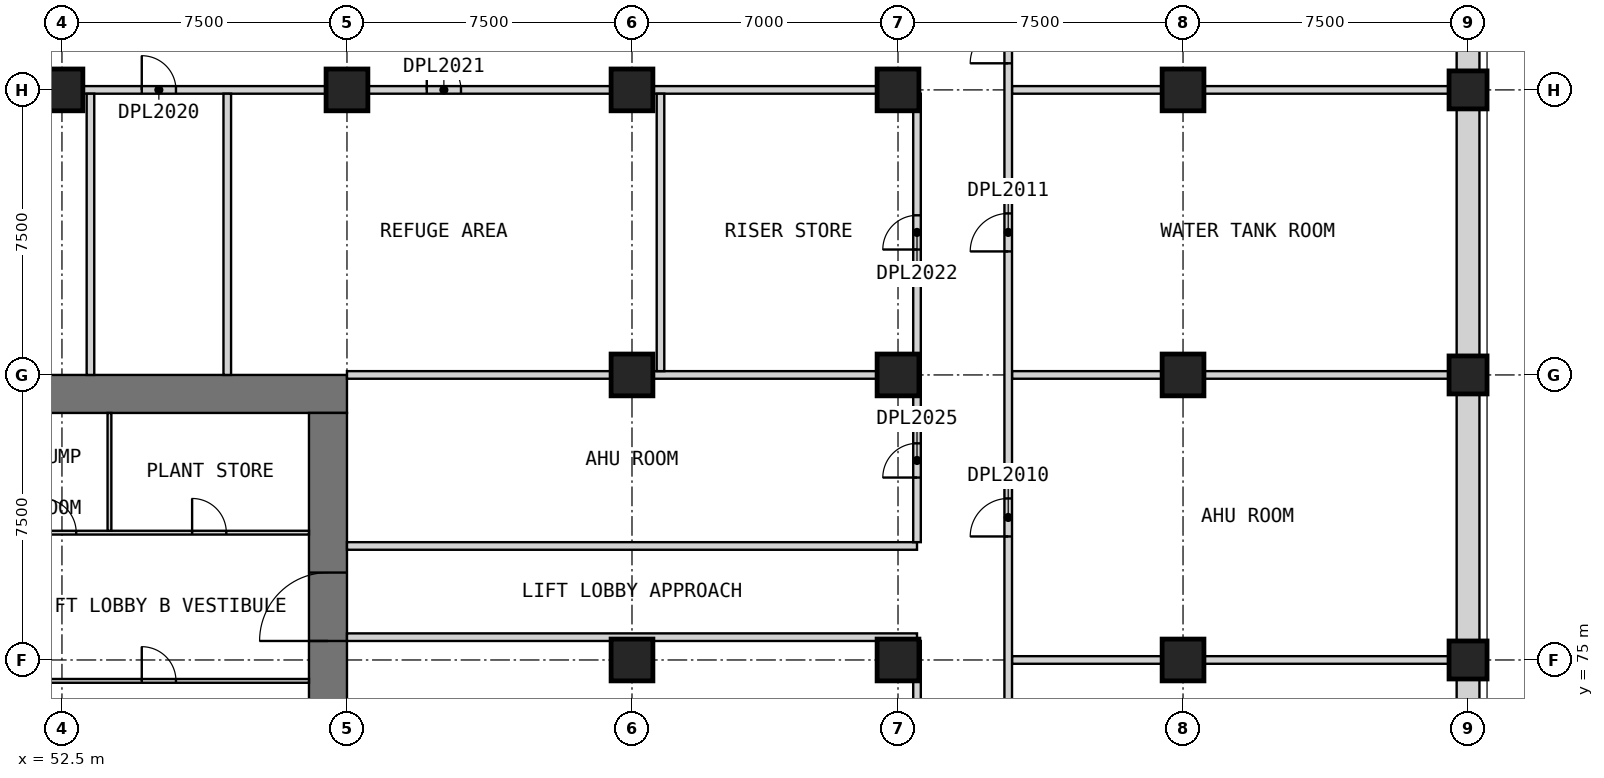
"""IFC4 building model, lengths in metres.
Left out: names, types, materials, properties, quantities, classifications, styles, units other than length and angle.
Written with IfcOpenShell. Run it as: python <this file> out.ifc"""

import sys

from ifc_helpers import new_model, si_unit, direction, frame, frame_2d, origin, origin_2d, place, context, subcontext, project, spatial, rectangle, extrude, element, fill, save


model = new_model("IFC4")
c1 = context("Model", 3, precision=1e-05, world=origin(), true_north=direction((0.0, 1.0)))
c2 = subcontext(c1, "Body", "Model", "MODEL_VIEW")
j1 = project(units=[si_unit("LENGTHUNIT", "METRE"), si_unit("PLANEANGLEUNIT", "RADIAN")], contexts=[c1])
p1 = place(None, origin())
s1 = spatial("IfcSite", under=j1, at=p1, CompositionType="ELEMENT")
p2 = place(p1, origin())
s2 = spatial("IfcBuilding", under=s1, at=p2, CompositionType="ELEMENT")
p3 = place(p2, frame((0.0, 0.0, 118.7)))
s3 = spatial("IfcBuildingStorey", under=s2, at=p3, CompositionType="ELEMENT", Elevation=118.7)
for number, where, z_axis, x_axis in (
    (1, (52.5, 90.0, 0.0), (0.0, 0.0, 1.0), (1.0, 0.0, 0.0)),
    (2, (60.0, 90.0, 0.0), (0.0, 0.0, 1.0), (1.0, 0.0, 0.0)),
    (3, (67.5, 75.0, 0.0), (0.0, 0.0, 1.0), (1.0, 0.0, 0.0)),
    (4, (67.5, 82.5, 0.0), (0.0, 0.0, 1.0), (1.0, 0.0, 0.0)),
    (5, (67.5, 90.0, 0.0), (0.0, 0.0, 1.0), (1.0, 0.0, 0.0)),
    (6, (74.5, 75.0, 0.0), (0.0, 0.0, 1.0), (1.0, 0.0, 0.0)),
    (7, (74.5, 82.5, 0.0), (0.0, 0.0, 1.0), (1.0, 0.0, 0.0)),
    (8, (74.5, 90.0, 0.0), (0.0, 0.0, 1.0), (1.0, 0.0, 0.0)),
    (9, (82.0, 75.0, 0.0), (0.0, 0.0, 1.0), (1.0, 0.0, 0.0)),
    (10, (82.0, 82.5, 0.0), (0.0, 0.0, 1.0), (1.0, 0.0, 0.0)),
    (11, (82.0, 90.0, 0.0), (0.0, 0.0, 1.0), (1.0, 0.0, 0.0)),
):
    element("IfcColumn", number, at=place(p3, frame(where, z_axis=z_axis, x_axis=x_axis)), inside=s3, PredefinedType="COLUMN", context=c2, shape_type="SweptSolid", body=[
        extrude(rectangle(XDim=1.1, YDim=1.1, at=origin_2d()), origin(), (0.0, 0.0, 1.0), 5.5),
    ])
for number, where, z_axis, x_axis in (
    (12, (89.5, 75.0, 0.0), (0.0, 0.0, 1.0), (1.0, 0.0, 0.0)),
    (13, (89.5, 82.5, 0.0), (0.0, 0.0, 1.0), (1.0, 0.0, 0.0)),
    (14, (89.5, 90.0, 0.0), (0.0, 0.0, 1.0), (1.0, 0.0, 0.0)),
):
    element("IfcColumn", number, at=place(p3, frame(where, z_axis=z_axis, x_axis=x_axis)), inside=s3, PredefinedType="COLUMN", context=c2, shape_type="SweptSolid", body=[
        extrude(rectangle(XDim=1.0, YDim=1.0, at=origin_2d()), origin(), (0.0, 0.0, 1.0), 5.5),
    ])
p4 = place(p3, frame((30.0, 82.0, 0.0), z_axis=(0.0, 0.0, 1.0), x_axis=(1.0, 0.0, 0.0)))
e15 = element("IfcWall", 15, at=p4, inside=s3, PredefinedType="SHEAR", context=c2, shape_type="SweptSolid", body=[
    extrude(rectangle(XDim=30.0, YDim=1.0, at=frame_2d((15.0, 0.0))), origin(), (0.0, 0.0, 1.0), 5.5),
])
p5 = place(p3, frame((59.5, 61.0, 0.0), z_axis=(0.0, 0.0, 1.0), x_axis=(0.0, 1.0, 0.0)))
e16 = element("IfcWall", 16, at=p5, inside=s3, PredefinedType="SHEAR", context=c2, shape_type="SweptSolid", body=[
    extrude(rectangle(XDim=20.5, YDim=1.0, at=frame_2d((10.25, 0.0))), origin(), (0.0, 0.0, 1.0), 5.5),
])
p6 = place(p5, frame((14.5, 0.0, 0.0)))
e17 = element("IfcOpeningElement", 17, at=p6, cuts=e16, PredefinedType="OPENING", context=c2, shape_type="SweptSolid", body=[
    extrude(rectangle(XDim=1.8, YDim=2.1, at=frame_2d((0.9, 1.05))), frame((0.0, 0.51, 0.0), z_axis=(0.0, -1.0, 0.0), x_axis=(1.0, 0.0, 0.0)), (0.0, 0.0, 1.0), 1.02),
])
for number, where, z_axis, x_axis in (
    (18, (89.5, 68.0, 0.0), (0.0, 0.0, 1.0), (0.0, 1.0, 0.0)),
    (19, (89.5, 75.5, 0.0), (0.0, 0.0, 1.0), (0.0, 1.0, 0.0)),
    (20, (89.5, 83.0, 0.0), (0.0, 0.0, 1.0), (0.0, 1.0, 0.0)),
):
    element("IfcWall", number, at=place(p3, frame(where, z_axis=z_axis, x_axis=x_axis)), inside=s3, PredefinedType="ELEMENTEDWALL", context=c2, shape_type="SweptSolid", body=[
        extrude(rectangle(XDim=6.5, YDim=0.6, at=frame_2d((3.25, 0.0))), origin(), (0.0, 0.0, 1.0), 5.2),
    ])
p7 = place(p3, frame((89.5, 90.5, 0.0), z_axis=(0.0, 0.0, 1.0), x_axis=(0.0, 1.0, 0.0)))
e21 = element("IfcWall", 21, at=p7, inside=s3, PredefinedType="ELEMENTEDWALL", context=c2, shape_type="SweptSolid", body=[
    extrude(rectangle(XDim=6.0, YDim=0.6, at=frame_2d((3.0, 0.0))), origin(), (0.0, 0.0, 1.0), 5.2),
])
p8 = place(p3, frame((51.1, 74.45, 0.0), z_axis=(0.0, 0.0, 1.0), x_axis=(1.0, 0.0, 0.0)))
e22 = element("IfcWall", 22, at=p8, inside=s3, PredefinedType="PARTITIONING", context=c2, shape_type="SweptSolid", body=[
    extrude(rectangle(XDim=7.9, YDim=0.1, at=frame_2d((3.95, 0.0))), origin(), (0.0, 0.0, 1.0), 5.2),
])
p9 = place(p8, frame((3.5, 0.0, 0.0)))
e23 = element("IfcOpeningElement", 23, at=p9, cuts=e22, PredefinedType="OPENING", context=c2, shape_type="SweptSolid", body=[
    extrude(rectangle(XDim=0.9, YDim=2.1, at=frame_2d((0.45, 1.05))), frame((0.0, 0.06, 0.0), z_axis=(0.0, -1.0, 0.0), x_axis=(1.0, 0.0, 0.0)), (0.0, 0.0, 1.0), 0.12),
])
p10 = place(p3, frame((51.1, 78.35, 0.0), z_axis=(0.0, 0.0, 1.0), x_axis=(1.0, 0.0, 0.0)))
e24 = element("IfcWall", 24, at=p10, inside=s3, PredefinedType="PARTITIONING", context=c2, shape_type="SweptSolid", body=[
    extrude(rectangle(XDim=7.9, YDim=0.1, at=frame_2d((3.95, 0.0))), origin(), (0.0, 0.0, 1.0), 5.2),
])
p11 = place(p10, frame((0.875, 0.0, 0.0)))
e25 = element("IfcOpeningElement", 25, at=p11, cuts=e24, PredefinedType="OPENING", context=c2, shape_type="SweptSolid", body=[
    extrude(rectangle(XDim=0.9, YDim=2.1, at=frame_2d((0.45, 1.05))), frame((0.0, 0.06, 0.0), z_axis=(0.0, -1.0, 0.0), x_axis=(1.0, 0.0, 0.0)), (0.0, 0.0, 1.0), 0.12),
])
p12 = place(p10, frame((4.825, 0.0, 0.0)))
e26 = element("IfcOpeningElement", 26, at=p12, cuts=e24, PredefinedType="OPENING", context=c2, shape_type="SweptSolid", body=[
    extrude(rectangle(XDim=0.9, YDim=2.1, at=frame_2d((0.45, 1.05))), frame((0.0, 0.06, 0.0), z_axis=(0.0, -1.0, 0.0), x_axis=(1.0, 0.0, 0.0)), (0.0, 0.0, 1.0), 0.12),
])
p13 = place(p3, frame((53.75, 78.4, 0.0), z_axis=(0.0, 0.0, 1.0), x_axis=(0.0, 1.0, 0.0)))
e27 = element("IfcWall", 27, at=p13, inside=s3, PredefinedType="PARTITIONING", context=c2, shape_type="SweptSolid", body=[
    extrude(rectangle(XDim=3.1, YDim=0.1, at=frame_2d((1.55, 0.0))), origin(), (0.0, 0.0, 1.0), 5.2),
])
p14 = place(p3, frame((77.5, 75.0, 0.0), z_axis=(0.0, 0.0, 1.0), x_axis=(1.0, 0.0, 0.0)))
e28 = element("IfcWall", 28, at=p14, inside=s3, PredefinedType="PARTITIONING", context=c2, shape_type="SweptSolid", body=[
    extrude(rectangle(XDim=12.5, YDim=0.2, at=frame_2d((6.25, 0.0))), origin(), (0.0, 0.0, 1.0), 4.0),
])
for number, where, z_axis, x_axis in (
    (29, (60.0, 75.6, 0.0), (0.0, 0.0, 1.0), (1.0, 0.0, 0.0)),
    (30, (60.0, 78.0, 0.0), (0.0, 0.0, 1.0), (1.0, 0.0, 0.0)),
):
    element("IfcWall", number, at=place(p3, frame(where, z_axis=z_axis, x_axis=x_axis)), inside=s3, PredefinedType="PARTITIONING", context=c2, shape_type="SweptSolid", body=[
        extrude(rectangle(XDim=15.0, YDim=0.2, at=frame_2d((7.5, 0.0))), origin(), (0.0, 0.0, 1.0), 5.2),
    ])
p15 = place(p3, frame((60.0, 82.5, 0.0), z_axis=(0.0, 0.0, 1.0), x_axis=(1.0, 0.0, 0.0)))
e31 = element("IfcWall", 31, at=p15, inside=s3, PredefinedType="PARTITIONING", context=c2, shape_type="SweptSolid", body=[
    extrude(rectangle(XDim=14.9, YDim=0.2, at=frame_2d((7.45, 0.0))), origin(), (0.0, 0.0, 1.0), 5.2),
])
p16 = place(p3, frame((77.5, 82.5, 0.0), z_axis=(0.0, 0.0, 1.0), x_axis=(1.0, 0.0, 0.0)))
e32 = element("IfcWall", 32, at=p16, inside=s3, PredefinedType="PARTITIONING", context=c2, shape_type="SweptSolid", body=[
    extrude(rectangle(XDim=12.5, YDim=0.2, at=frame_2d((6.25, 0.0))), origin(), (0.0, 0.0, 1.0), 4.0),
])
p17 = place(p3, frame((30.0, 90.0, 0.0), z_axis=(0.0, 0.0, 1.0), x_axis=(1.0, 0.0, 0.0)))
e33 = element("IfcWall", 33, at=p17, inside=s3, PredefinedType="PARTITIONING", context=c2, shape_type="SweptSolid", body=[
    extrude(rectangle(XDim=45.0, YDim=0.2, at=frame_2d((22.5, 0.0))), origin(), (0.0, 0.0, 1.0), 5.2),
])
p18 = place(p17, frame((11.175, 0.0, 0.0)))
e34 = element("IfcOpeningElement", 34, at=p18, cuts=e33, PredefinedType="OPENING", context=c2, shape_type="SweptSolid", body=[
    extrude(rectangle(XDim=0.9, YDim=2.1, at=frame_2d((0.45, 1.05))), frame((0.0, 0.11, 0.0), z_axis=(0.0, -1.0, 0.0), x_axis=(1.0, 0.0, 0.0)), (0.0, 0.0, 1.0), 0.22),
])
p19 = place(p17, frame((24.6, 0.0, 0.0)))
e35 = element("IfcOpeningElement", 35, at=p19, cuts=e33, PredefinedType="OPENING", context=c2, shape_type="SweptSolid", body=[
    extrude(rectangle(XDim=0.9, YDim=2.1, at=frame_2d((0.45, 1.05))), frame((0.0, 0.11, 0.0), z_axis=(0.0, -1.0, 0.0), x_axis=(1.0, 0.0, 0.0)), (0.0, 0.0, 1.0), 0.22),
])
p20 = place(p17, frame((32.1, 0.0, 0.0)))
e36 = element("IfcOpeningElement", 36, at=p20, cuts=e33, PredefinedType="OPENING", context=c2, shape_type="SweptSolid", body=[
    extrude(rectangle(XDim=0.9, YDim=2.1, at=frame_2d((0.45, 1.05))), frame((0.0, 0.11, 0.0), z_axis=(0.0, -1.0, 0.0), x_axis=(1.0, 0.0, 0.0)), (0.0, 0.0, 1.0), 0.22),
])
p21 = place(p3, frame((77.5, 90.0, 0.0), z_axis=(0.0, 0.0, 1.0), x_axis=(1.0, 0.0, 0.0)))
e37 = element("IfcWall", 37, at=p21, inside=s3, PredefinedType="PARTITIONING", context=c2, shape_type="SweptSolid", body=[
    extrude(rectangle(XDim=12.5, YDim=0.2, at=frame_2d((6.25, 0.0))), origin(), (0.0, 0.0, 1.0), 4.0),
])
for number, where, z_axis, x_axis in (
    (38, (53.25, 82.5, 0.0), (0.0, 0.0, 1.0), (0.0, 1.0, 0.0)),
    (39, (56.85, 82.5, 0.0), (0.0, 0.0, 1.0), (0.0, 1.0, 0.0)),
):
    element("IfcWall", number, at=place(p3, frame(where, z_axis=z_axis, x_axis=x_axis)), inside=s3, PredefinedType="PARTITIONING", context=c2, shape_type="SweptSolid", body=[
        extrude(rectangle(XDim=7.4, YDim=0.2, at=frame_2d((3.7, 0.0))), origin(), (0.0, 0.0, 1.0), 5.2),
    ])
p22 = place(p3, frame((68.25, 82.6, 0.0), z_axis=(0.0, 0.0, 1.0), x_axis=(0.0, 1.0, 0.0)))
e40 = element("IfcWall", 40, at=p22, inside=s3, PredefinedType="PARTITIONING", context=c2, shape_type="SweptSolid", body=[
    extrude(rectangle(XDim=7.3, YDim=0.2, at=frame_2d((3.65, 0.0))), origin(), (0.0, 0.0, 1.0), 5.2),
])
p23 = place(p3, frame((75.0, 67.0, 0.0), z_axis=(0.0, 0.0, 1.0), x_axis=(0.0, 1.0, 0.0)))
e41 = element("IfcWall", 41, at=p23, inside=s3, PredefinedType="PARTITIONING", context=c2, shape_type="SweptSolid", body=[
    extrude(rectangle(XDim=8.5, YDim=0.2, at=frame_2d((4.25, 0.0))), origin(), (0.0, 0.0, 1.0), 5.2),
])
p24 = place(p23, frame((3.8, 0.0, 0.0)))
e42 = element("IfcOpeningElement", 42, at=p24, cuts=e41, PredefinedType="OPENING", context=c2, shape_type="SweptSolid", body=[
    extrude(rectangle(XDim=0.9, YDim=2.1, at=frame_2d((0.45, 1.05))), frame((0.0, 0.11, 0.0), z_axis=(0.0, -1.0, 0.0), x_axis=(1.0, 0.0, 0.0)), (0.0, 0.0, 1.0), 0.22),
])
p25 = place(p3, frame((75.0, 78.1, 0.0), z_axis=(0.0, 0.0, 1.0), x_axis=(0.0, 1.0, 0.0)))
e43 = element("IfcWall", 43, at=p25, inside=s3, PredefinedType="PARTITIONING", context=c2, shape_type="SweptSolid", body=[
    extrude(rectangle(XDim=11.8, YDim=0.2, at=frame_2d((5.9, 0.0))), origin(), (0.0, 0.0, 1.0), 5.2),
])
p26 = place(p25, frame((7.7, 0.0, 0.0)))
e44 = element("IfcOpeningElement", 44, at=p26, cuts=e43, PredefinedType="OPENING", context=c2, shape_type="SweptSolid", body=[
    extrude(rectangle(XDim=0.9, YDim=2.1, at=frame_2d((0.45, 1.05))), frame((0.0, 0.11, 0.0), z_axis=(0.0, -1.0, 0.0), x_axis=(1.0, 0.0, 0.0)), (0.0, 0.0, 1.0), 0.22),
])
p27 = place(p25, frame((1.7, 0.0, 0.0)))
e45 = element("IfcOpeningElement", 45, at=p27, cuts=e43, PredefinedType="OPENING", context=c2, shape_type="SweptSolid", body=[
    extrude(rectangle(XDim=0.9, YDim=2.1, at=frame_2d((0.45, 1.05))), frame((0.0, 0.11, 0.0), z_axis=(0.0, -1.0, 0.0), x_axis=(1.0, 0.0, 0.0)), (0.0, 0.0, 1.0), 0.22),
])
p28 = place(p3, frame((77.4, 50.2, 0.0), z_axis=(0.0, 0.0, 1.0), x_axis=(0.0, 1.0, 0.0)))
e46 = element("IfcWall", 46, at=p28, inside=s3, PredefinedType="PARTITIONING", context=c2, shape_type="SweptSolid", body=[
    extrude(rectangle(XDim=42.1, YDim=0.2, at=frame_2d((21.05, 0.0))), origin(), (0.0, 0.0, 1.0), 5.2),
])
p29 = place(p28, frame((13.05, 0.0, 0.0)))
e47 = element("IfcOpeningElement", 47, at=p29, cuts=e46, PredefinedType="OPENING", context=c2, shape_type="SweptSolid", body=[
    extrude(rectangle(XDim=1.0, YDim=2.1, at=frame_2d((0.5, 1.05))), frame((0.0, 0.11, 0.0), z_axis=(0.0, -1.0, 0.0), x_axis=(1.0, 0.0, 0.0)), (0.0, 0.0, 1.0), 0.22),
])
p30 = place(p28, frame((28.05, 0.0, 0.0)))
e48 = element("IfcOpeningElement", 48, at=p30, cuts=e46, PredefinedType="OPENING", context=c2, shape_type="SweptSolid", body=[
    extrude(rectangle(XDim=1.0, YDim=2.1, at=frame_2d((0.5, 1.05))), frame((0.0, 0.11, 0.0), z_axis=(0.0, -1.0, 0.0), x_axis=(1.0, 0.0, 0.0)), (0.0, 0.0, 1.0), 0.22),
])
p31 = place(p28, frame((35.55, 0.0, 0.0)))
e49 = element("IfcOpeningElement", 49, at=p31, cuts=e46, PredefinedType="OPENING", context=c2, shape_type="SweptSolid", body=[
    extrude(rectangle(XDim=1.0, YDim=2.1, at=frame_2d((0.5, 1.05))), frame((0.0, 0.11, 0.0), z_axis=(0.0, -1.0, 0.0), x_axis=(1.0, 0.0, 0.0)), (0.0, 0.0, 1.0), 0.22),
])
p32 = place(p28, frame((0.6, 0.0, 0.0)))
e50 = element("IfcOpeningElement", 50, at=p32, cuts=e46, PredefinedType="OPENING", context=c2, shape_type="SweptSolid", body=[
    extrude(rectangle(XDim=1.0, YDim=2.1, at=frame_2d((0.5, 1.05))), frame((0.0, 0.11, 0.0), z_axis=(0.0, -1.0, 0.0), x_axis=(1.0, 0.0, 0.0)), (0.0, 0.0, 1.0), 0.22),
])
p33 = place(p28, frame((40.5, 0.0, 0.0)))
e51 = element("IfcOpeningElement", 51, at=p33, cuts=e46, PredefinedType="OPENING", context=c2, shape_type="SweptSolid", body=[
    extrude(rectangle(XDim=1.0, YDim=2.1, at=frame_2d((0.5, 1.05))), frame((0.0, 0.11, 0.0), z_axis=(0.0, -1.0, 0.0), x_axis=(1.0, 0.0, 0.0)), (0.0, 0.0, 1.0), 0.22),
])
p34 = place(p6, origin())
e52 = element("IfcDoor", 52, at=p34, inside=s3, OperationType="DOUBLE_DOOR_SINGLE_SWING", PredefinedType="DOOR", context=c2, shape_type="SweptSolid", body=[
    extrude(rectangle(XDim=1.8, YDim=2.1, at=frame_2d((0.9, 1.05))), frame((0.0, 0.025, 0.0), z_axis=(0.0, -1.0, 0.0), x_axis=(1.0, 0.0, 0.0)), (0.0, 0.0, 1.0), 0.05),
])
fill(e17, e52)
p35 = place(p9, origin())
e53 = element("IfcDoor", 53, at=p35, inside=s3, OperationType="SINGLE_SWING_LEFT", PredefinedType="DOOR", context=c2, shape_type="SweptSolid", body=[
    extrude(rectangle(XDim=0.9, YDim=2.1, at=frame_2d((0.45, 1.05))), frame((0.0, 0.025, 0.0), z_axis=(0.0, -1.0, 0.0), x_axis=(1.0, 0.0, 0.0)), (0.0, 0.0, 1.0), 0.05),
])
fill(e23, e53)
p36 = place(p11, origin())
e54 = element("IfcDoor", 54, at=p36, inside=s3, OperationType="SINGLE_SWING_LEFT", PredefinedType="DOOR", context=c2, shape_type="SweptSolid", body=[
    extrude(rectangle(XDim=0.9, YDim=2.1, at=frame_2d((0.45, 1.05))), frame((0.0, 0.025, 0.0), z_axis=(0.0, -1.0, 0.0), x_axis=(1.0, 0.0, 0.0)), (0.0, 0.0, 1.0), 0.05),
])
fill(e25, e54)
p37 = place(p12, origin())
e55 = element("IfcDoor", 55, at=p37, inside=s3, OperationType="SINGLE_SWING_RIGHT", PredefinedType="DOOR", context=c2, shape_type="SweptSolid", body=[
    extrude(rectangle(XDim=0.9, YDim=2.1, at=frame_2d((0.45, 1.05))), frame((0.0, 0.025, 0.0), z_axis=(0.0, -1.0, 0.0), x_axis=(1.0, 0.0, 0.0)), (0.0, 0.0, 1.0), 0.05),
])
fill(e26, e55)
p38 = place(p30, origin())
e56 = element("IfcDoor", 56, at=p38, inside=s3, OperationType="SINGLE_SWING_RIGHT", PredefinedType="DOOR", context=c2, shape_type="SweptSolid", body=[
    extrude(rectangle(XDim=1.0, YDim=2.1, at=frame_2d((0.5, 1.05))), frame((0.0, 0.025, 0.0), z_axis=(0.0, -1.0, 0.0), x_axis=(1.0, 0.0, 0.0)), (0.0, 0.0, 1.0), 0.05),
])
fill(e48, e56)
p39 = place(p31, origin())
e57 = element("IfcDoor", 57, at=p39, inside=s3, OperationType="SINGLE_SWING_RIGHT", PredefinedType="DOOR", context=c2, shape_type="SweptSolid", body=[
    extrude(rectangle(XDim=1.0, YDim=2.1, at=frame_2d((0.5, 1.05))), frame((0.0, 0.025, 0.0), z_axis=(0.0, -1.0, 0.0), x_axis=(1.0, 0.0, 0.0)), (0.0, 0.0, 1.0), 0.05),
])
fill(e49, e57)
p40 = place(p33, origin())
e58 = element("IfcDoor", 58, at=p40, inside=s3, OperationType="SINGLE_SWING_LEFT", PredefinedType="DOOR", context=c2, shape_type="SweptSolid", body=[
    extrude(rectangle(XDim=1.0, YDim=2.1, at=frame_2d((0.5, 1.05))), frame((0.0, 0.025, 0.0), z_axis=(0.0, -1.0, 0.0), x_axis=(1.0, 0.0, 0.0)), (0.0, 0.0, 1.0), 0.05),
])
fill(e51, e58)
p41 = place(p19, origin())
e59 = element("IfcDoor", 59, at=p41, inside=s3, OperationType="SINGLE_SWING_RIGHT", PredefinedType="DOOR", context=c2, shape_type="SweptSolid", body=[
    extrude(rectangle(XDim=0.9, YDim=2.1, at=frame_2d((0.45, 1.05))), frame((0.0, 0.025, 0.0), z_axis=(0.0, -1.0, 0.0), x_axis=(1.0, 0.0, 0.0)), (0.0, 0.0, 1.0), 0.05),
])
fill(e35, e59)
p42 = place(p20, origin())
e60 = element("IfcDoor", 60, at=p42, inside=s3, OperationType="SINGLE_SWING_RIGHT", PredefinedType="DOOR", context=c2, shape_type="SweptSolid", body=[
    extrude(rectangle(XDim=0.9, YDim=2.1, at=frame_2d((0.45, 1.05))), frame((0.0, 0.025, 0.0), z_axis=(0.0, -1.0, 0.0), x_axis=(1.0, 0.0, 0.0)), (0.0, 0.0, 1.0), 0.05),
])
fill(e36, e60)
p43 = place(p26, origin())
e61 = element("IfcDoor", 61, at=p43, inside=s3, OperationType="SINGLE_SWING_LEFT", PredefinedType="DOOR", context=c2, shape_type="SweptSolid", body=[
    extrude(rectangle(XDim=0.9, YDim=2.1, at=frame_2d((0.45, 1.05))), frame((0.0, 0.025, 0.0), z_axis=(0.0, -1.0, 0.0), x_axis=(1.0, 0.0, 0.0)), (0.0, 0.0, 1.0), 0.05),
])
fill(e44, e61)
p44 = place(p27, origin())
e62 = element("IfcDoor", 62, at=p44, inside=s3, OperationType="SINGLE_SWING_LEFT", PredefinedType="DOOR", context=c2, shape_type="SweptSolid", body=[
    extrude(rectangle(XDim=0.9, YDim=2.1, at=frame_2d((0.45, 1.05))), frame((0.0, 0.025, 0.0), z_axis=(0.0, -1.0, 0.0), x_axis=(1.0, 0.0, 0.0)), (0.0, 0.0, 1.0), 0.05),
])
fill(e45, e62)
save(model, sys.argv[1])
